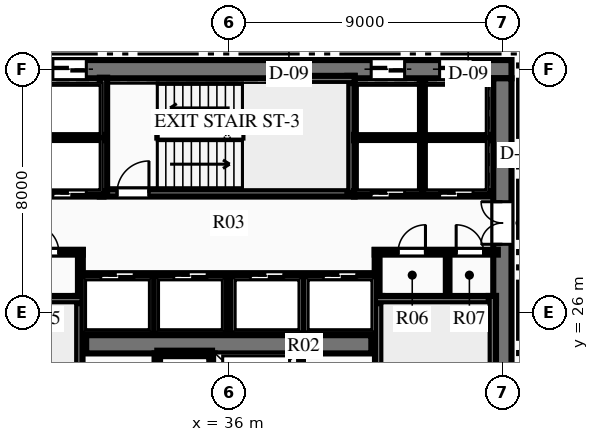
"""IFC4 building model, lengths in metres.
Left out: names, types, materials, properties, quantities, classifications, styles, units other than length and angle.
Written with IfcOpenShell. Run it as: python <this file> out.ifc"""

import sys

from ifc_helpers import new_model, si_unit, direction, frame, frame_2d, origin, place, context, subcontext, project, spatial, rectangle, extrude, element, fill, save


model = new_model("IFC4")
c1 = context("Model", 3, precision=1e-05, world=origin(), true_north=direction((0.0, 1.0)))
c2 = subcontext(c1, "Body", "Model", "MODEL_VIEW")
j1 = project(units=[si_unit("LENGTHUNIT", "METRE"), si_unit("PLANEANGLEUNIT", "RADIAN")], contexts=[c1])
p1 = place(None, origin())
s1 = spatial("IfcSite", under=j1, at=p1, CompositionType="ELEMENT")
p2 = place(p1, origin())
s2 = spatial("IfcBuilding", under=s1, at=p2, CompositionType="ELEMENT")
p3 = place(p2, frame((0.0, 0.0, 66.45)))
s3 = spatial("IfcBuildingStorey", under=s2, at=p3, CompositionType="ELEMENT", Elevation=66.45)
p4 = place(p3, frame((26.7, 34.0, 0.0), z_axis=(0.0, 0.0, 1.0), x_axis=(1.0, 0.0, 0.0)))
e1 = element("IfcWall", 1, at=p4, inside=s3, PredefinedType="SHEAR", context=c2, shape_type="SweptSolid", body=[
    extrude(rectangle(XDim=18.6, YDim=0.6, at=frame_2d((9.3, 0.0))), origin(), (0.0, 0.0, 1.0), 3.75),
])
p5 = place(p4, frame((1.265, 0.0, 0.0)))
e2 = element("IfcOpeningElement", 2, at=p5, cuts=e1, PredefinedType="OPENING", context=c2, shape_type="SweptSolid", body=[
    extrude(rectangle(XDim=1.1, YDim=2.15, at=frame_2d((0.55, 1.075))), frame((0.0, 0.31, 0.0), z_axis=(0.0, -1.0, 0.0), x_axis=(1.0, 0.0, 0.0)), (0.0, 0.0, 1.0), 0.62),
])
p6 = place(p4, frame((3.515, 0.0, 0.0)))
e3 = element("IfcOpeningElement", 3, at=p6, cuts=e1, PredefinedType="OPENING", context=c2, shape_type="SweptSolid", body=[
    extrude(rectangle(XDim=1.1, YDim=2.15, at=frame_2d((0.55, 1.075))), frame((0.0, 0.31, 0.0), z_axis=(0.0, -1.0, 0.0), x_axis=(1.0, 0.0, 0.0)), (0.0, 0.0, 1.0), 0.62),
])
p7 = place(p4, frame((13.985, 0.0, 0.0)))
e4 = element("IfcOpeningElement", 4, at=p7, cuts=e1, PredefinedType="OPENING", context=c2, shape_type="SweptSolid", body=[
    extrude(rectangle(XDim=1.1, YDim=2.15, at=frame_2d((0.55, 1.075))), frame((0.0, 0.31, 0.0), z_axis=(0.0, -1.0, 0.0), x_axis=(1.0, 0.0, 0.0)), (0.0, 0.0, 1.0), 0.62),
])
p8 = place(p4, frame((16.235, 0.0, 0.0)))
e5 = element("IfcOpeningElement", 5, at=p8, cuts=e1, PredefinedType="OPENING", context=c2, shape_type="SweptSolid", body=[
    extrude(rectangle(XDim=1.1, YDim=2.15, at=frame_2d((0.55, 1.075))), frame((0.0, 0.31, 0.0), z_axis=(0.0, -1.0, 0.0), x_axis=(1.0, 0.0, 0.0)), (0.0, 0.0, 1.0), 0.62),
])
p9 = place(p3, frame((45.0, 18.3, 0.0), z_axis=(0.0, 0.0, 1.0), x_axis=(0.0, 1.0, 0.0)))
e6 = element("IfcWall", 6, at=p9, inside=s3, PredefinedType="SHEAR", context=c2, shape_type="SweptSolid", body=[
    extrude(rectangle(XDim=15.4, YDim=0.6, at=frame_2d((7.7, 0.0))), origin(), (0.0, 0.0, 1.0), 3.75),
])
p10 = place(p9, frame((9.94, 0.0, 0.0)))
e7 = element("IfcOpeningElement", 7, at=p10, cuts=e6, PredefinedType="OPENING", context=c2, shape_type="SweptSolid", body=[
    extrude(rectangle(XDim=1.4, YDim=2.2, at=frame_2d((0.7, 1.1))), frame((0.0, 0.31, 0.0), z_axis=(0.0, -1.0, 0.0), x_axis=(1.0, 0.0, 0.0)), (0.0, 0.0, 1.0), 0.62),
])
p11 = place(p3, frame((31.31, 24.95, 0.0), z_axis=(0.0, 0.0, 1.0), x_axis=(1.0, 0.0, 0.0)))
e8 = element("IfcWall", 8, at=p11, inside=s3, PredefinedType="SHEAR", context=c2, shape_type="SweptSolid", body=[
    extrude(rectangle(XDim=9.38, YDim=0.6, at=frame_2d((4.69, 0.0))), origin(), (0.0, 0.0, 1.0), 3.75),
])
p12 = place(p3, frame((31.07, 18.28, 0.0), z_axis=(0.0, 0.0, 1.0), x_axis=(0.0, 1.0, 0.0)))
e9 = element("IfcWall", 9, at=p12, inside=s3, PredefinedType="SHEAR", context=c2, shape_type="SweptSolid", body=[
    extrude(rectangle(XDim=8.26, YDim=0.24, at=frame_2d((4.13, 0.0))), origin(), (0.0, 0.0, 1.0), 3.75),
])
p13 = place(p12, frame((0.365, 0.0, 0.0)))
e10 = element("IfcOpeningElement", 10, at=p13, cuts=e9, PredefinedType="OPENING", context=c2, shape_type="SweptSolid", body=[
    extrude(rectangle(XDim=1.05, YDim=2.15, at=frame_2d((0.525, 1.075))), frame((0.0, 0.13, 0.0), z_axis=(0.0, -1.0, 0.0), x_axis=(1.0, 0.0, 0.0)), (0.0, 0.0, 1.0), 0.26),
])
p14 = place(p3, frame((27.21, 26.42, 0.0), z_axis=(0.0, 0.0, 1.0), x_axis=(1.0, 0.0, 0.0)))
e11 = element("IfcWall", 11, at=p14, inside=s3, PredefinedType="SHEAR", context=c2, shape_type="SweptSolid", body=[
    extrude(rectangle(XDim=3.98, YDim=0.24, at=frame_2d((1.99, 0.0))), origin(), (0.0, 0.0, 1.0), 3.75),
])
p15 = place(p3, frame((40.93, 18.28, 0.0), z_axis=(0.0, 0.0, 1.0), x_axis=(0.0, 1.0, 0.0)))
e12 = element("IfcWall", 12, at=p15, inside=s3, PredefinedType="SHEAR", context=c2, shape_type="SweptSolid", body=[
    extrude(rectangle(XDim=8.26, YDim=0.24, at=frame_2d((4.13, 0.0))), origin(), (0.0, 0.0, 1.0), 3.75),
])
p16 = place(p15, frame((0.365, 0.0, 0.0)))
e13 = element("IfcOpeningElement", 13, at=p16, cuts=e12, PredefinedType="OPENING", context=c2, shape_type="SweptSolid", body=[
    extrude(rectangle(XDim=1.05, YDim=2.15, at=frame_2d((0.525, 1.075))), frame((0.0, 0.13, 0.0), z_axis=(0.0, -1.0, 0.0), x_axis=(1.0, 0.0, 0.0)), (0.0, 0.0, 1.0), 0.26),
])
p17 = place(p3, frame((40.81, 26.42, 0.0), z_axis=(0.0, 0.0, 1.0), x_axis=(1.0, 0.0, 0.0)))
e14 = element("IfcWall", 14, at=p17, inside=s3, PredefinedType="SHEAR", context=c2, shape_type="SweptSolid", body=[
    extrude(rectangle(XDim=3.98, YDim=0.24, at=frame_2d((1.99, 0.0))), origin(), (0.0, 0.0, 1.0), 3.75),
])
p18 = place(p3, frame((44.67, 18.28, 0.0), z_axis=(0.0, 0.0, 1.0), x_axis=(0.0, 1.0, 0.0)))
e15 = element("IfcWall", 15, at=p18, inside=s3, PredefinedType="SHEAR", context=c2, shape_type="SweptSolid", body=[
    extrude(rectangle(XDim=8.26, YDim=0.24, at=frame_2d((4.13, 0.0))), origin(), (0.0, 0.0, 1.0), 3.75),
])
p19 = place(p3, frame((31.76, 29.93, 0.0), z_axis=(0.0, 0.0, 1.0), x_axis=(1.0, 0.0, 0.0)))
e16 = element("IfcWall", 16, at=p19, inside=s3, PredefinedType="SHEAR", context=c2, shape_type="SweptSolid", body=[
    extrude(rectangle(XDim=8.38, YDim=0.24, at=frame_2d((4.19, 0.0))), origin(), (0.0, 0.0, 1.0), 3.75),
])
p20 = place(p19, frame((0.565, 0.0, 0.0)))
e17 = element("IfcOpeningElement", 17, at=p20, cuts=e16, PredefinedType="OPENING", context=c2, shape_type="SweptSolid", body=[
    extrude(rectangle(XDim=1.05, YDim=2.15, at=frame_2d((0.525, 1.075))), frame((0.0, 0.13, 0.0), z_axis=(0.0, -1.0, 0.0), x_axis=(1.0, 0.0, 0.0)), (0.0, 0.0, 1.0), 0.26),
])
p21 = place(p3, frame((31.88, 29.93, 0.0), z_axis=(0.0, 0.0, 1.0), x_axis=(0.0, 1.0, 0.0)))
e18 = element("IfcWall", 18, at=p21, inside=s3, PredefinedType="SHEAR", context=c2, shape_type="SweptSolid", body=[
    extrude(rectangle(XDim=3.79, YDim=0.24, at=frame_2d((1.895, 0.0))), origin(), (0.0, 0.0, 1.0), 3.75),
])
p22 = place(p3, frame((40.02, 29.93, 0.0), z_axis=(0.0, 0.0, 1.0), x_axis=(0.0, 1.0, 0.0)))
e19 = element("IfcWall", 19, at=p22, inside=s3, PredefinedType="SHEAR", context=c2, shape_type="SweptSolid", body=[
    extrude(rectangle(XDim=3.85, YDim=0.24, at=frame_2d((1.925, 0.0))), origin(), (0.0, 0.0, 1.0), 3.75),
])
p23 = place(p3, frame((37.85, 33.66, 0.0), z_axis=(0.0, 0.0, 1.0), x_axis=(1.0, 0.0, 0.0)))
e20 = element("IfcWall", 20, at=p23, inside=s3, PredefinedType="SHEAR", context=c2, shape_type="SweptSolid", body=[
    extrude(rectangle(XDim=2.29, YDim=0.24, at=frame_2d((1.145, 0.0))), origin(), (0.0, 0.0, 1.0), 3.75),
])
for number, where, z_axis, x_axis in (
    (21, (33.65, 22.05, 0.0), (0.0, 0.0, 1.0), (0.0, 1.0, 0.0)),
    (22, (35.45, 22.05, 0.0), (0.0, 0.0, 1.0), (0.0, 1.0, 0.0)),
):
    element("IfcWall", number, at=place(p3, frame(where, z_axis=z_axis, x_axis=x_axis)), inside=s3, PredefinedType="PARTITIONING", context=c2, shape_type="SweptSolid", body=[
        extrude(rectangle(XDim=2.6, YDim=0.18, at=frame_2d((1.3, 0.0))), origin(), (0.0, 0.0, 1.0), 3.44),
    ])
p24 = place(p3, frame((33.65, 24.65, 0.0), z_axis=(0.0, 0.0, 1.0), x_axis=(1.0, 0.0, 0.0)))
e23 = element("IfcWall", 23, at=p24, inside=s3, PredefinedType="PARTITIONING", context=c2, shape_type="SweptSolid", body=[
    extrude(rectangle(XDim=1.8, YDim=0.18, at=frame_2d((0.9, 0.0))), origin(), (0.0, 0.0, 1.0), 3.44),
])
p25 = place(p3, frame((38.35, 22.05, 0.0), z_axis=(0.0, 0.0, 1.0), x_axis=(0.0, 1.0, 0.0)))
e24 = element("IfcWall", 24, at=p25, inside=s3, PredefinedType="PARTITIONING", context=c2, shape_type="SweptSolid", body=[
    extrude(rectangle(XDim=2.6, YDim=0.18, at=frame_2d((1.3, 0.0))), origin(), (0.0, 0.0, 1.0), 3.44),
])
p26 = place(p3, frame((27.15, 27.98, 0.0), z_axis=(0.0, 0.0, 1.0), x_axis=(1.0, 0.0, 0.0)))
e25 = element("IfcWall", 25, at=p26, inside=s3, PredefinedType="PARTITIONING", context=c2, shape_type="SweptSolid", body=[
    extrude(rectangle(XDim=4.05, YDim=0.16, at=frame_2d((2.025, 0.0))), origin(), (0.0, 0.0, 1.0), 3.44),
])
p27 = place(p26, frame((0.47, 0.0, 0.0)))
e26 = element("IfcOpeningElement", 26, at=p27, cuts=e25, PredefinedType="OPENING", context=c2, shape_type="SweptSolid", body=[
    extrude(rectangle(XDim=0.9, YDim=2.15, at=frame_2d((0.45, 1.075))), frame((0.0, 0.09, 0.0), z_axis=(0.0, -1.0, 0.0), x_axis=(1.0, 0.0, 0.0)), (0.0, 0.0, 1.0), 0.18),
])
p28 = place(p26, frame((2.36, 0.0, 0.0)))
e27 = element("IfcOpeningElement", 27, at=p28, cuts=e25, PredefinedType="OPENING", context=c2, shape_type="SweptSolid", body=[
    extrude(rectangle(XDim=0.9, YDim=2.15, at=frame_2d((0.45, 1.075))), frame((0.0, 0.09, 0.0), z_axis=(0.0, -1.0, 0.0), x_axis=(1.0, 0.0, 0.0)), (0.0, 0.0, 1.0), 0.18),
])
p29 = place(p3, frame((31.12, 26.54, 0.0), z_axis=(0.0, 0.0, 1.0), x_axis=(0.0, 1.0, 0.0)))
e28 = element("IfcWall", 28, at=p29, inside=s3, PredefinedType="PARTITIONING", context=c2, shape_type="SweptSolid", body=[
    extrude(rectangle(XDim=1.51, YDim=0.16, at=frame_2d((0.755, 0.0))), origin(), (0.0, 0.0, 1.0), 3.44),
])
p30 = place(p3, frame((40.8, 27.98, 0.0), z_axis=(0.0, 0.0, 1.0), x_axis=(1.0, 0.0, 0.0)))
e29 = element("IfcWall", 29, at=p30, inside=s3, PredefinedType="PARTITIONING", context=c2, shape_type="SweptSolid", body=[
    extrude(rectangle(XDim=4.05, YDim=0.16, at=frame_2d((2.025, 0.0))), origin(), (0.0, 0.0, 1.0), 3.44),
])
p31 = place(p30, frame((0.77, 0.0, 0.0)))
e30 = element("IfcOpeningElement", 30, at=p31, cuts=e29, PredefinedType="OPENING", context=c2, shape_type="SweptSolid", body=[
    extrude(rectangle(XDim=0.9, YDim=2.15, at=frame_2d((0.45, 1.075))), frame((0.0, 0.09, 0.0), z_axis=(0.0, -1.0, 0.0), x_axis=(1.0, 0.0, 0.0)), (0.0, 0.0, 1.0), 0.18),
])
p32 = place(p30, frame((2.68, 0.0, 0.0)))
e31 = element("IfcOpeningElement", 31, at=p32, cuts=e29, PredefinedType="OPENING", context=c2, shape_type="SweptSolid", body=[
    extrude(rectangle(XDim=0.9, YDim=2.15, at=frame_2d((0.45, 1.075))), frame((0.0, 0.09, 0.0), z_axis=(0.0, -1.0, 0.0), x_axis=(1.0, 0.0, 0.0)), (0.0, 0.0, 1.0), 0.18),
])
p33 = place(p3, frame((40.88, 26.54, 0.0), z_axis=(0.0, 0.0, 1.0), x_axis=(0.0, 1.0, 0.0)))
e32 = element("IfcWall", 32, at=p33, inside=s3, PredefinedType="PARTITIONING", context=c2, shape_type="SweptSolid", body=[
    extrude(rectangle(XDim=1.51, YDim=0.16, at=frame_2d((0.755, 0.0))), origin(), (0.0, 0.0, 1.0), 3.44),
])
p34 = place(p3, frame((43.2, 26.54, 0.0), z_axis=(0.0, 0.0, 1.0), x_axis=(0.0, 1.0, 0.0)))
e33 = element("IfcWall", 33, at=p34, inside=s3, PredefinedType="PARTITIONING", context=c2, shape_type="SweptSolid", body=[
    extrude(rectangle(XDim=1.44, YDim=0.12, at=frame_2d((0.72, 0.0))), origin(), (0.0, 0.0, 1.0), 3.44),
])
p35 = place(p3, frame((27.45, 29.9, 0.0), z_axis=(0.0, 0.0, 1.0), x_axis=(1.0, 0.0, 0.0)))
e34 = element("IfcWall", 34, at=p35, inside=s3, PredefinedType="PARTITIONING", context=c2, shape_type="SweptSolid", body=[
    extrude(rectangle(XDim=4.43, YDim=0.18, at=frame_2d((2.215, 0.0))), origin(), (0.0, 0.0, 1.0), 3.44),
])
p36 = place(p35, frame((0.515, 0.0, 0.0)))
e35 = element("IfcOpeningElement", 35, at=p36, cuts=e34, PredefinedType="OPENING", context=c2, shape_type="SweptSolid", body=[
    extrude(rectangle(XDim=1.1, YDim=2.15, at=frame_2d((0.55, 1.075))), frame((0.0, 0.1, 0.0), z_axis=(0.0, -1.0, 0.0), x_axis=(1.0, 0.0, 0.0)), (0.0, 0.0, 1.0), 0.2),
])
p37 = place(p35, frame((2.765, 0.0, 0.0)))
e36 = element("IfcOpeningElement", 36, at=p37, cuts=e34, PredefinedType="OPENING", context=c2, shape_type="SweptSolid", body=[
    extrude(rectangle(XDim=1.1, YDim=2.15, at=frame_2d((0.55, 1.075))), frame((0.0, 0.1, 0.0), z_axis=(0.0, -1.0, 0.0), x_axis=(1.0, 0.0, 0.0)), (0.0, 0.0, 1.0), 0.2),
])
p38 = place(p3, frame((27.45, 31.75, 0.0), z_axis=(0.0, 0.0, 1.0), x_axis=(1.0, 0.0, 0.0)))
e37 = element("IfcWall", 37, at=p38, inside=s3, PredefinedType="PARTITIONING", context=c2, shape_type="SweptSolid", body=[
    extrude(rectangle(XDim=4.43, YDim=0.18, at=frame_2d((2.215, 0.0))), origin(), (0.0, 0.0, 1.0), 3.44),
])
p39 = place(p3, frame((40.12, 29.9, 0.0), z_axis=(0.0, 0.0, 1.0), x_axis=(1.0, 0.0, 0.0)))
e38 = element("IfcWall", 38, at=p39, inside=s3, PredefinedType="PARTITIONING", context=c2, shape_type="SweptSolid", body=[
    extrude(rectangle(XDim=4.43, YDim=0.18, at=frame_2d((2.215, 0.0))), origin(), (0.0, 0.0, 1.0), 3.44),
])
p40 = place(p39, frame((0.565, 0.0, 0.0)))
e39 = element("IfcOpeningElement", 39, at=p40, cuts=e38, PredefinedType="OPENING", context=c2, shape_type="SweptSolid", body=[
    extrude(rectangle(XDim=1.1, YDim=2.15, at=frame_2d((0.55, 1.075))), frame((0.0, 0.1, 0.0), z_axis=(0.0, -1.0, 0.0), x_axis=(1.0, 0.0, 0.0)), (0.0, 0.0, 1.0), 0.2),
])
p41 = place(p39, frame((2.815, 0.0, 0.0)))
e40 = element("IfcOpeningElement", 40, at=p41, cuts=e38, PredefinedType="OPENING", context=c2, shape_type="SweptSolid", body=[
    extrude(rectangle(XDim=1.1, YDim=2.15, at=frame_2d((0.55, 1.075))), frame((0.0, 0.1, 0.0), z_axis=(0.0, -1.0, 0.0), x_axis=(1.0, 0.0, 0.0)), (0.0, 0.0, 1.0), 0.2),
])
p42 = place(p3, frame((40.12, 31.75, 0.0), z_axis=(0.0, 0.0, 1.0), x_axis=(1.0, 0.0, 0.0)))
e41 = element("IfcWall", 41, at=p42, inside=s3, PredefinedType="PARTITIONING", context=c2, shape_type="SweptSolid", body=[
    extrude(rectangle(XDim=4.43, YDim=0.18, at=frame_2d((2.215, 0.0))), origin(), (0.0, 0.0, 1.0), 3.44),
])
p43 = place(p3, frame((42.37, 29.9, 0.0), z_axis=(0.0, 0.0, 1.0), x_axis=(0.0, 1.0, 0.0)))
e42 = element("IfcWall", 42, at=p43, inside=s3, PredefinedType="PARTITIONING", context=c2, shape_type="SweptSolid", body=[
    extrude(rectangle(XDim=3.75, YDim=0.18, at=frame_2d((1.875, 0.0))), origin(), (0.0, 0.0, 1.0), 3.44),
])
p44 = place(p3, frame((31.2, 27.2, 0.0), z_axis=(0.0, 0.0, 1.0), x_axis=(1.0, 0.0, 0.0)))
e43 = element("IfcWall", 43, at=p44, inside=s3, PredefinedType="PARTITIONING", context=c2, shape_type="SweptSolid", body=[
    extrude(rectangle(XDim=9.6, YDim=0.18, at=frame_2d((4.8, 0.0))), origin(), (0.0, 0.0, 1.0), 3.44),
])
p45 = place(p44, frame((0.59, 0.0, 0.0)))
e44 = element("IfcOpeningElement", 44, at=p45, cuts=e43, PredefinedType="OPENING", context=c2, shape_type="SweptSolid", body=[
    extrude(rectangle(XDim=1.1, YDim=2.15, at=frame_2d((0.55, 1.075))), frame((0.0, 0.1, 0.0), z_axis=(0.0, -1.0, 0.0), x_axis=(1.0, 0.0, 0.0)), (0.0, 0.0, 1.0), 0.2),
])
p46 = place(p44, frame((2.99, 0.0, 0.0)))
e45 = element("IfcOpeningElement", 45, at=p46, cuts=e43, PredefinedType="OPENING", context=c2, shape_type="SweptSolid", body=[
    extrude(rectangle(XDim=1.1, YDim=2.15, at=frame_2d((0.55, 1.075))), frame((0.0, 0.1, 0.0), z_axis=(0.0, -1.0, 0.0), x_axis=(1.0, 0.0, 0.0)), (0.0, 0.0, 1.0), 0.2),
])
p47 = place(p44, frame((5.51, 0.0, 0.0)))
e46 = element("IfcOpeningElement", 46, at=p47, cuts=e43, PredefinedType="OPENING", context=c2, shape_type="SweptSolid", body=[
    extrude(rectangle(XDim=1.1, YDim=2.15, at=frame_2d((0.55, 1.075))), frame((0.0, 0.1, 0.0), z_axis=(0.0, -1.0, 0.0), x_axis=(1.0, 0.0, 0.0)), (0.0, 0.0, 1.0), 0.2),
])
p48 = place(p44, frame((7.91, 0.0, 0.0)))
e47 = element("IfcOpeningElement", 47, at=p48, cuts=e43, PredefinedType="OPENING", context=c2, shape_type="SweptSolid", body=[
    extrude(rectangle(XDim=1.1, YDim=2.15, at=frame_2d((0.55, 1.075))), frame((0.0, 0.1, 0.0), z_axis=(0.0, -1.0, 0.0), x_axis=(1.0, 0.0, 0.0)), (0.0, 0.0, 1.0), 0.2),
])
for number, where, z_axis, x_axis in (
    (48, (33.54, 25.3, 0.0), (0.0, 0.0, 1.0), (0.0, 1.0, 0.0)),
    (49, (36.0, 25.3, 0.0), (0.0, 0.0, 1.0), (0.0, 1.0, 0.0)),
    (50, (38.46, 25.3, 0.0), (0.0, 0.0, 1.0), (0.0, 1.0, 0.0)),
):
    element("IfcWall", number, at=place(p3, frame(where, z_axis=z_axis, x_axis=x_axis)), inside=s3, PredefinedType="PARTITIONING", context=c2, shape_type="SweptSolid", body=[
        extrude(rectangle(XDim=1.9, YDim=0.18, at=frame_2d((0.95, 0.0))), origin(), (0.0, 0.0, 1.0), 3.44),
    ])
p49 = place(p28, origin())
e51 = element("IfcDoor", 51, at=p49, inside=s3, OperationType="SINGLE_SWING_LEFT", PredefinedType="DOOR", context=c2, shape_type="SweptSolid", body=[
    extrude(rectangle(XDim=0.9, YDim=2.15, at=frame_2d((0.45, 1.075))), frame((0.0, 0.025, 0.0), z_axis=(0.0, -1.0, 0.0), x_axis=(1.0, 0.0, 0.0)), (0.0, 0.0, 1.0), 0.05),
])
fill(e27, e51)
p50 = place(p31, origin())
e52 = element("IfcDoor", 52, at=p50, inside=s3, OperationType="SINGLE_SWING_RIGHT", PredefinedType="DOOR", context=c2, shape_type="SweptSolid", body=[
    extrude(rectangle(XDim=0.9, YDim=2.15, at=frame_2d((0.45, 1.075))), frame((0.0, 0.025, 0.0), z_axis=(0.0, -1.0, 0.0), x_axis=(1.0, 0.0, 0.0)), (0.0, 0.0, 1.0), 0.05),
])
fill(e30, e52)
p51 = place(p32, origin())
e53 = element("IfcDoor", 53, at=p51, inside=s3, OperationType="SINGLE_SWING_LEFT", PredefinedType="DOOR", context=c2, shape_type="SweptSolid", body=[
    extrude(rectangle(XDim=0.9, YDim=2.15, at=frame_2d((0.45, 1.075))), frame((0.0, 0.025, 0.0), z_axis=(0.0, -1.0, 0.0), x_axis=(1.0, 0.0, 0.0)), (0.0, 0.0, 1.0), 0.05),
])
fill(e31, e53)
p52 = place(p20, origin())
e54 = element("IfcDoor", 54, at=p52, inside=s3, OperationType="SINGLE_SWING_RIGHT", PredefinedType="DOOR", context=c2, shape_type="SweptSolid", body=[
    extrude(rectangle(XDim=1.05, YDim=2.15, at=frame_2d((0.525, 1.075))), frame((0.0, 0.025, 0.0), z_axis=(0.0, -1.0, 0.0), x_axis=(1.0, 0.0, 0.0)), (0.0, 0.0, 1.0), 0.05),
])
fill(e17, e54)
p53 = place(p10, origin())
e55 = element("IfcDoor", 55, at=p53, inside=s3, OperationType="DOUBLE_DOOR_SINGLE_SWING", PredefinedType="DOOR", context=c2, shape_type="SweptSolid", body=[
    extrude(rectangle(XDim=1.4, YDim=2.2, at=frame_2d((0.7, 1.1))), frame((0.0, 0.025, 0.0), z_axis=(0.0, -1.0, 0.0), x_axis=(1.0, 0.0, 0.0)), (0.0, 0.0, 1.0), 0.05),
])
fill(e7, e55)
p54 = place(p37, origin())
e56 = element("IfcDoor", 56, at=p54, inside=s3, OperationType="SLIDING_TO_LEFT", PredefinedType="DOOR", context=c2, shape_type="SweptSolid", body=[
    extrude(rectangle(XDim=1.1, YDim=2.15, at=frame_2d((0.55, 1.075))), frame((0.0, 0.025, 0.0), z_axis=(0.0, -1.0, 0.0), x_axis=(1.0, 0.0, 0.0)), (0.0, 0.0, 1.0), 0.05),
])
fill(e36, e56)
p55 = place(p6, origin())
e57 = element("IfcDoor", 57, at=p55, inside=s3, OperationType="SLIDING_TO_LEFT", PredefinedType="DOOR", context=c2, shape_type="SweptSolid", body=[
    extrude(rectangle(XDim=1.1, YDim=2.15, at=frame_2d((0.55, 1.075))), frame((0.0, 0.025, 0.0), z_axis=(0.0, -1.0, 0.0), x_axis=(1.0, 0.0, 0.0)), (0.0, 0.0, 1.0), 0.05),
])
fill(e3, e57)
p56 = place(p40, origin())
e58 = element("IfcDoor", 58, at=p56, inside=s3, OperationType="SLIDING_TO_LEFT", PredefinedType="DOOR", context=c2, shape_type="SweptSolid", body=[
    extrude(rectangle(XDim=1.1, YDim=2.15, at=frame_2d((0.55, 1.075))), frame((0.0, 0.025, 0.0), z_axis=(0.0, -1.0, 0.0), x_axis=(1.0, 0.0, 0.0)), (0.0, 0.0, 1.0), 0.05),
])
fill(e39, e58)
p57 = place(p41, origin())
e59 = element("IfcDoor", 59, at=p57, inside=s3, OperationType="SLIDING_TO_LEFT", PredefinedType="DOOR", context=c2, shape_type="SweptSolid", body=[
    extrude(rectangle(XDim=1.1, YDim=2.15, at=frame_2d((0.55, 1.075))), frame((0.0, 0.025, 0.0), z_axis=(0.0, -1.0, 0.0), x_axis=(1.0, 0.0, 0.0)), (0.0, 0.0, 1.0), 0.05),
])
fill(e40, e59)
p58 = place(p7, origin())
e60 = element("IfcDoor", 60, at=p58, inside=s3, OperationType="SLIDING_TO_LEFT", PredefinedType="DOOR", context=c2, shape_type="SweptSolid", body=[
    extrude(rectangle(XDim=1.1, YDim=2.15, at=frame_2d((0.55, 1.075))), frame((0.0, 0.025, 0.0), z_axis=(0.0, -1.0, 0.0), x_axis=(1.0, 0.0, 0.0)), (0.0, 0.0, 1.0), 0.05),
])
fill(e4, e60)
p59 = place(p8, origin())
e61 = element("IfcDoor", 61, at=p59, inside=s3, OperationType="SLIDING_TO_LEFT", PredefinedType="DOOR", context=c2, shape_type="SweptSolid", body=[
    extrude(rectangle(XDim=1.1, YDim=2.15, at=frame_2d((0.55, 1.075))), frame((0.0, 0.025, 0.0), z_axis=(0.0, -1.0, 0.0), x_axis=(1.0, 0.0, 0.0)), (0.0, 0.0, 1.0), 0.05),
])
fill(e5, e61)
p60 = place(p45, origin())
e62 = element("IfcDoor", 62, at=p60, inside=s3, OperationType="SLIDING_TO_LEFT", PredefinedType="DOOR", context=c2, shape_type="SweptSolid", body=[
    extrude(rectangle(XDim=1.1, YDim=2.15, at=frame_2d((0.55, 1.075))), frame((0.0, 0.025, 0.0), z_axis=(0.0, -1.0, 0.0), x_axis=(1.0, 0.0, 0.0)), (0.0, 0.0, 1.0), 0.05),
])
fill(e44, e62)
p61 = place(p46, origin())
e63 = element("IfcDoor", 63, at=p61, inside=s3, OperationType="SLIDING_TO_LEFT", PredefinedType="DOOR", context=c2, shape_type="SweptSolid", body=[
    extrude(rectangle(XDim=1.1, YDim=2.15, at=frame_2d((0.55, 1.075))), frame((0.0, 0.025, 0.0), z_axis=(0.0, -1.0, 0.0), x_axis=(1.0, 0.0, 0.0)), (0.0, 0.0, 1.0), 0.05),
])
fill(e45, e63)
p62 = place(p47, origin())
e64 = element("IfcDoor", 64, at=p62, inside=s3, OperationType="SLIDING_TO_LEFT", PredefinedType="DOOR", context=c2, shape_type="SweptSolid", body=[
    extrude(rectangle(XDim=1.1, YDim=2.15, at=frame_2d((0.55, 1.075))), frame((0.0, 0.025, 0.0), z_axis=(0.0, -1.0, 0.0), x_axis=(1.0, 0.0, 0.0)), (0.0, 0.0, 1.0), 0.05),
])
fill(e46, e64)
p63 = place(p48, origin())
e65 = element("IfcDoor", 65, at=p63, inside=s3, OperationType="SLIDING_TO_LEFT", PredefinedType="DOOR", context=c2, shape_type="SweptSolid", body=[
    extrude(rectangle(XDim=1.1, YDim=2.15, at=frame_2d((0.55, 1.075))), frame((0.0, 0.025, 0.0), z_axis=(0.0, -1.0, 0.0), x_axis=(1.0, 0.0, 0.0)), (0.0, 0.0, 1.0), 0.05),
])
fill(e47, e65)
save(model, sys.argv[1])
